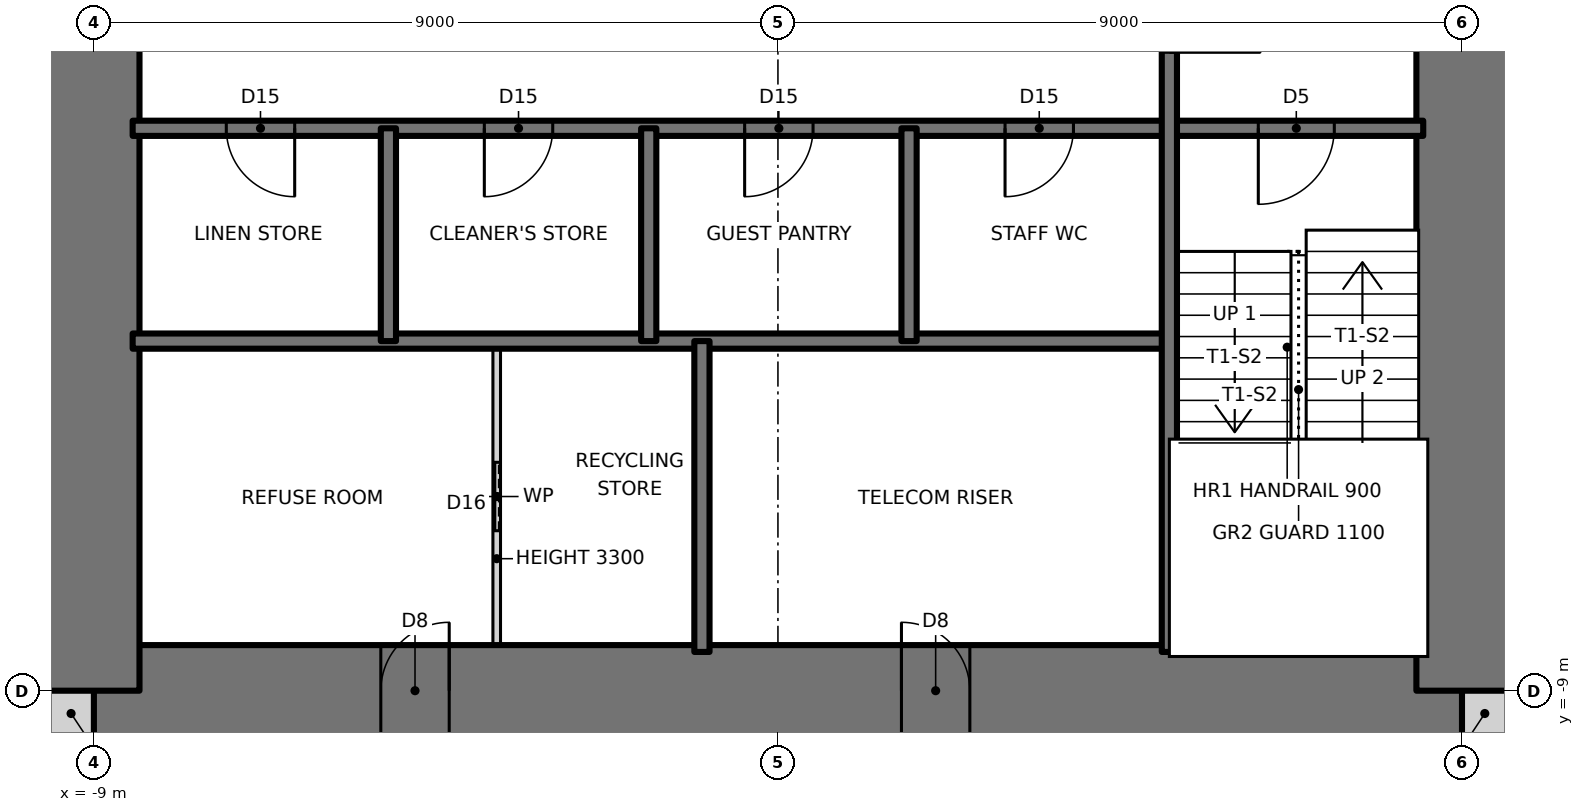
"""IFC4 building model, lengths in metres.
Left out: names, types, materials, properties, quantities, classifications, styles, units other than length and angle.
Written with IfcOpenShell. Run it as: python <this file> out.ifc"""

import sys

from ifc_helpers import new_model, si_unit, direction, frame, frame_2d, origin, place, context, subcontext, project, spatial, rectangle, extrude, element, fill, save


model = new_model("IFC4")
c1 = context("Model", 3, precision=1e-05, world=origin(), true_north=direction((0.0, 1.0)))
c2 = subcontext(c1, "Body", "Model", "MODEL_VIEW")
j1 = project(units=[si_unit("LENGTHUNIT", "METRE"), si_unit("PLANEANGLEUNIT", "RADIAN")], contexts=[c1])
p1 = place(None, origin())
s1 = spatial("IfcSite", under=j1, at=p1, CompositionType="ELEMENT")
p2 = place(p1, origin())
s2 = spatial("IfcBuilding", under=s1, at=p2, CompositionType="ELEMENT")
p3 = place(p2, frame((0.0, 0.0, 257.0)))
s3 = spatial("IfcBuildingStorey", under=s2, at=p3, CompositionType="ELEMENT", Elevation=257.0)
for number, where, z_axis, x_axis in (
    (1, (-9.6, -9.3, 0.0), (0.0, 0.0, 1.0), (1.0, 0.0, 0.0)),
    (2, (9.0, -9.3, 0.0), (0.0, 0.0, 1.0), (1.0, 0.0, 0.0)),
):
    element("IfcWall", number, at=place(p3, frame(where, z_axis=z_axis, x_axis=x_axis)), inside=s3, PredefinedType="SOLIDWALL", context=c2, shape_type="SweptSolid", body=[
        extrude(rectangle(XDim=0.6, YDim=0.6, at=frame_2d((0.3, 0.0))), origin(), (0.0, 0.0, 1.0), 3.5),
    ])
p4 = place(p3, frame((-9.0, -9.0, 0.0), z_axis=(0.0, 0.0, 1.0), x_axis=(1.0, 0.0, 0.0)))
e3 = element("IfcWall", 3, at=p4, inside=s3, PredefinedType="SHEAR", context=c2, shape_type="SweptSolid", body=[
    extrude(rectangle(XDim=18.0, YDim=1.2, at=frame_2d((9.0, 0.0))), origin(), (0.0, 0.0, 1.0), 3.5),
])
p5 = place(p4, frame((3.775, 0.0, 0.0)))
e4 = element("IfcOpeningElement", 4, at=p5, cuts=e3, PredefinedType="OPENING", context=c2, shape_type="SweptSolid", body=[
    extrude(rectangle(XDim=0.9, YDim=2.1, at=frame_2d((0.45, 1.05))), frame((0.0, 0.61, 0.0), z_axis=(0.0, -1.0, 0.0), x_axis=(1.0, 0.0, 0.0)), (0.0, 0.0, 1.0), 1.22),
])
p6 = place(p4, frame((10.625, 0.0, 0.0)))
e5 = element("IfcOpeningElement", 5, at=p6, cuts=e3, PredefinedType="OPENING", context=c2, shape_type="SweptSolid", body=[
    extrude(rectangle(XDim=0.9, YDim=2.1, at=frame_2d((0.45, 1.05))), frame((0.0, 0.61, 0.0), z_axis=(0.0, -1.0, 0.0), x_axis=(1.0, 0.0, 0.0)), (0.0, 0.0, 1.0), 1.22),
])
p7 = place(p3, frame((9.0, -9.0, 0.0), z_axis=(0.0, 0.0, 1.0), x_axis=(0.0, 1.0, 0.0)))
e6 = element("IfcWall", 6, at=p7, inside=s3, PredefinedType="SHEAR", context=c2, shape_type="SweptSolid", body=[
    extrude(rectangle(XDim=18.0, YDim=1.2, at=frame_2d((9.0, 0.0))), origin(), (0.0, 0.0, 1.0), 3.5),
])
p8 = place(p7, frame((8.5, 0.0, 0.0)))
e7 = element("IfcOpeningElement", 7, at=p8, cuts=e6, PredefinedType="OPENING", context=c2, shape_type="SweptSolid", body=[
    extrude(rectangle(XDim=1.0, YDim=2.1, at=frame_2d((0.5, 1.05))), frame((0.0, 0.61, 0.0), z_axis=(0.0, -1.0, 0.0), x_axis=(1.0, 0.0, 0.0)), (0.0, 0.0, 1.0), 1.22),
])
p9 = place(p3, frame((-9.0, 9.0, 0.0), z_axis=(0.0, 0.0, 1.0), x_axis=(0.0, -1.0, 0.0)))
e8 = element("IfcWall", 8, at=p9, inside=s3, PredefinedType="SHEAR", context=c2, shape_type="SweptSolid", body=[
    extrude(rectangle(XDim=18.0, YDim=1.2, at=frame_2d((9.0, 0.0))), origin(), (0.0, 0.0, 1.0), 3.5),
])
p10 = place(p9, frame((8.5, 0.0, 0.0)))
e9 = element("IfcOpeningElement", 9, at=p10, cuts=e8, PredefinedType="OPENING", context=c2, shape_type="SweptSolid", body=[
    extrude(rectangle(XDim=1.0, YDim=2.1, at=frame_2d((0.5, 1.05))), frame((0.0, 0.61, 0.0), z_axis=(0.0, -1.0, 0.0), x_axis=(1.0, 0.0, 0.0)), (0.0, 0.0, 1.0), 1.22),
])
p11 = place(p3, frame((-8.49, -4.4, 0.0), z_axis=(0.0, 0.0, 1.0), x_axis=(1.0, 0.0, 0.0)))
e10 = element("IfcWall", 10, at=p11, inside=s3, PredefinedType="SOLIDWALL", context=c2, shape_type="SweptSolid", body=[
    extrude(rectangle(XDim=13.64, YDim=0.2, at=frame_2d((6.82, 0.0))), origin(), (0.0, 0.0, 1.0), 3.5),
])
p12 = place(p3, frame((-8.49, -1.6, 0.0), z_axis=(0.0, 0.0, 1.0), x_axis=(1.0, 0.0, 0.0)))
e11 = element("IfcWall", 11, at=p12, inside=s3, PredefinedType="SOLIDWALL", context=c2, shape_type="SweptSolid", body=[
    extrude(rectangle(XDim=16.98, YDim=0.2, at=frame_2d((8.49, 0.0))), origin(), (0.0, 0.0, 1.0), 3.5),
])
p13 = place(p12, frame((14.81, 0.0, 0.0)))
e12 = element("IfcOpeningElement", 12, at=p13, cuts=e11, PredefinedType="OPENING", context=c2, shape_type="SweptSolid", body=[
    extrude(rectangle(XDim=1.0, YDim=2.1, at=frame_2d((0.5, 1.05))), frame((0.0, 0.11, 0.0), z_axis=(0.0, -1.0, 0.0), x_axis=(1.0, 0.0, 0.0)), (0.0, 0.0, 1.0), 0.22),
])
p14 = place(p12, frame((1.232, 0.0, 0.0)))
e13 = element("IfcOpeningElement", 13, at=p14, cuts=e11, PredefinedType="OPENING", context=c2, shape_type="SweptSolid", body=[
    extrude(rectangle(XDim=0.9, YDim=2.1, at=frame_2d((0.45, 1.05))), frame((0.0, 0.11, 0.0), z_axis=(0.0, -1.0, 0.0), x_axis=(1.0, 0.0, 0.0)), (0.0, 0.0, 1.0), 0.22),
])
p15 = place(p12, frame((4.627, 0.0, 0.0)))
e14 = element("IfcOpeningElement", 14, at=p15, cuts=e11, PredefinedType="OPENING", context=c2, shape_type="SweptSolid", body=[
    extrude(rectangle(XDim=0.9, YDim=2.1, at=frame_2d((0.45, 1.05))), frame((0.0, 0.11, 0.0), z_axis=(0.0, -1.0, 0.0), x_axis=(1.0, 0.0, 0.0)), (0.0, 0.0, 1.0), 0.22),
])
p16 = place(p12, frame((8.052, 0.0, 0.0)))
e15 = element("IfcOpeningElement", 15, at=p16, cuts=e11, PredefinedType="OPENING", context=c2, shape_type="SweptSolid", body=[
    extrude(rectangle(XDim=0.9, YDim=2.1, at=frame_2d((0.45, 1.05))), frame((0.0, 0.11, 0.0), z_axis=(0.0, -1.0, 0.0), x_axis=(1.0, 0.0, 0.0)), (0.0, 0.0, 1.0), 0.22),
])
p17 = place(p12, frame((11.478, 0.0, 0.0)))
e16 = element("IfcOpeningElement", 16, at=p17, cuts=e11, PredefinedType="OPENING", context=c2, shape_type="SweptSolid", body=[
    extrude(rectangle(XDim=0.9, YDim=2.1, at=frame_2d((0.45, 1.05))), frame((0.0, 0.11, 0.0), z_axis=(0.0, -1.0, 0.0), x_axis=(1.0, 0.0, 0.0)), (0.0, 0.0, 1.0), 0.22),
])
p18 = place(p3, frame((5.15, -8.49, 0.0), z_axis=(0.0, 0.0, 1.0), x_axis=(0.0, 1.0, 0.0)))
e17 = element("IfcWall", 17, at=p18, inside=s3, PredefinedType="SOLIDWALL", context=c2, shape_type="SweptSolid", body=[
    extrude(rectangle(XDim=13.09, YDim=0.2, at=frame_2d((6.545, 0.0))), origin(), (0.0, 0.0, 1.0), 3.5),
])
p19 = place(p18, frame((7.89, 0.0, 0.0)))
e18 = element("IfcOpeningElement", 18, at=p19, cuts=e17, PredefinedType="OPENING", context=c2, shape_type="SweptSolid", body=[
    extrude(rectangle(XDim=1.2, YDim=2.1, at=frame_2d((0.6, 1.05))), frame((0.0, 0.11, 0.0), z_axis=(0.0, -1.0, 0.0), x_axis=(1.0, 0.0, 0.0)), (0.0, 0.0, 1.0), 0.22),
])
p20 = place(p3, frame((1.725, -4.4, 0.0), z_axis=(0.0, 0.0, 1.0), x_axis=(0.0, 1.0, 0.0)))
e19 = element("IfcWall", 19, at=p20, inside=s3, PredefinedType="SOLIDWALL", context=c2, shape_type="SweptSolid", body=[
    extrude(rectangle(XDim=2.8, YDim=0.2, at=frame_2d((1.4, 0.0))), origin(), (0.0, 0.0, 1.0), 3.5),
])
p21 = place(p3, frame((-1.0, -8.49, 0.0), z_axis=(0.0, 0.0, 1.0), x_axis=(0.0, 1.0, 0.0)))
e20 = element("IfcWall", 20, at=p21, inside=s3, PredefinedType="SOLIDWALL", context=c2, shape_type="SweptSolid", body=[
    extrude(rectangle(XDim=4.09, YDim=0.2, at=frame_2d((2.045, 0.0))), origin(), (0.0, 0.0, 1.0), 3.5),
])
p22 = place(p3, frame((-1.7, -4.4, 0.0), z_axis=(0.0, 0.0, 1.0), x_axis=(0.0, 1.0, 0.0)))
e21 = element("IfcWall", 21, at=p22, inside=s3, PredefinedType="SOLIDWALL", context=c2, shape_type="SweptSolid", body=[
    extrude(rectangle(XDim=2.8, YDim=0.2, at=frame_2d((1.4, 0.0))), origin(), (0.0, 0.0, 1.0), 3.5),
])
p23 = place(p3, frame((-3.7, -8.49, 0.0), z_axis=(0.0, 0.0, 1.0), x_axis=(0.0, 1.0, 0.0)))
e22 = element("IfcWall", 22, at=p23, inside=s3, PredefinedType="PARTITIONING", context=c2, shape_type="SweptSolid", body=[
    extrude(rectangle(XDim=4.09, YDim=0.1, at=frame_2d((2.045, 0.0))), origin(), (0.0, 0.0, 1.0), 3.3),
])
p24 = place(p23, frame((1.595, 0.0, 0.0)))
e23 = element("IfcOpeningElement", 23, at=p24, cuts=e22, PredefinedType="OPENING", context=c2, shape_type="SweptSolid", body=[
    extrude(rectangle(XDim=0.9, YDim=2.1, at=frame_2d((0.45, 1.05))), frame((0.0, 0.06, 0.0), z_axis=(0.0, -1.0, 0.0), x_axis=(1.0, 0.0, 0.0)), (0.0, 0.0, 1.0), 0.12),
])
p25 = place(p3, frame((-5.125, -4.4, 0.0), z_axis=(0.0, 0.0, 1.0), x_axis=(0.0, 1.0, 0.0)))
e24 = element("IfcWall", 24, at=p25, inside=s3, PredefinedType="SOLIDWALL", context=c2, shape_type="SweptSolid", body=[
    extrude(rectangle(XDim=2.8, YDim=0.2, at=frame_2d((1.4, 0.0))), origin(), (0.0, 0.0, 1.0), 3.5),
])
p26 = place(p13, frame((1.0, 0.0, 0.0), z_axis=(0.0, 0.0, 1.0), x_axis=(-1.0, 0.0, 0.0)))
e25 = element("IfcDoor", 25, at=p26, inside=s3, OperationType="SINGLE_SWING_RIGHT", PredefinedType="DOOR", context=c2, shape_type="SweptSolid", body=[
    extrude(rectangle(XDim=1.0, YDim=2.1, at=frame_2d((0.5, 1.05))), frame((0.0, 0.025, 0.0), z_axis=(0.0, -1.0, 0.0), x_axis=(1.0, 0.0, 0.0)), (0.0, 0.0, 1.0), 0.05),
])
fill(e12, e25)
p27 = place(p19, frame((1.2, 0.0, 0.0), z_axis=(0.0, 0.0, 1.0), x_axis=(-1.0, 0.0, 0.0)))
e26 = element("IfcDoor", 26, at=p27, inside=s3, OperationType="SINGLE_SWING_RIGHT", PredefinedType="DOOR", context=c2, shape_type="SweptSolid", body=[
    extrude(rectangle(XDim=1.2, YDim=2.1, at=frame_2d((0.6, 1.05))), frame((0.0, 0.025, 0.0), z_axis=(0.0, -1.0, 0.0), x_axis=(1.0, 0.0, 0.0)), (0.0, 0.0, 1.0), 0.05),
])
fill(e18, e26)
p28 = place(p14, frame((0.9, 0.0, 0.0), z_axis=(0.0, 0.0, 1.0), x_axis=(-1.0, 0.0, 0.0)))
e27 = element("IfcDoor", 27, at=p28, inside=s3, OperationType="SINGLE_SWING_LEFT", PredefinedType="DOOR", context=c2, shape_type="SweptSolid", body=[
    extrude(rectangle(XDim=0.9, YDim=2.1, at=frame_2d((0.45, 1.05))), frame((0.0, 0.025, 0.0), z_axis=(0.0, -1.0, 0.0), x_axis=(1.0, 0.0, 0.0)), (0.0, 0.0, 1.0), 0.05),
])
fill(e13, e27)
p29 = place(p15, frame((0.9, 0.0, 0.0), z_axis=(0.0, 0.0, 1.0), x_axis=(-1.0, 0.0, 0.0)))
e28 = element("IfcDoor", 28, at=p29, inside=s3, OperationType="SINGLE_SWING_RIGHT", PredefinedType="DOOR", context=c2, shape_type="SweptSolid", body=[
    extrude(rectangle(XDim=0.9, YDim=2.1, at=frame_2d((0.45, 1.05))), frame((0.0, 0.025, 0.0), z_axis=(0.0, -1.0, 0.0), x_axis=(1.0, 0.0, 0.0)), (0.0, 0.0, 1.0), 0.05),
])
fill(e14, e28)
p30 = place(p16, frame((0.9, 0.0, 0.0), z_axis=(0.0, 0.0, 1.0), x_axis=(-1.0, 0.0, 0.0)))
e29 = element("IfcDoor", 29, at=p30, inside=s3, OperationType="SINGLE_SWING_RIGHT", PredefinedType="DOOR", context=c2, shape_type="SweptSolid", body=[
    extrude(rectangle(XDim=0.9, YDim=2.1, at=frame_2d((0.45, 1.05))), frame((0.0, 0.025, 0.0), z_axis=(0.0, -1.0, 0.0), x_axis=(1.0, 0.0, 0.0)), (0.0, 0.0, 1.0), 0.05),
])
fill(e15, e29)
p31 = place(p17, frame((0.9, 0.0, 0.0), z_axis=(0.0, 0.0, 1.0), x_axis=(-1.0, 0.0, 0.0)))
e30 = element("IfcDoor", 30, at=p31, inside=s3, OperationType="SINGLE_SWING_RIGHT", PredefinedType="DOOR", context=c2, shape_type="SweptSolid", body=[
    extrude(rectangle(XDim=0.9, YDim=2.1, at=frame_2d((0.45, 1.05))), frame((0.0, 0.025, 0.0), z_axis=(0.0, -1.0, 0.0), x_axis=(1.0, 0.0, 0.0)), (0.0, 0.0, 1.0), 0.05),
])
fill(e16, e30)
p32 = place(p24, origin())
e31 = element("IfcDoor", 31, at=p32, inside=s3, OperationType="SLIDING_TO_LEFT", PredefinedType="DOOR", context=c2, shape_type="SweptSolid", body=[
    extrude(rectangle(XDim=0.9, YDim=2.1, at=frame_2d((0.45, 1.05))), frame((0.0, 0.025, 0.0), z_axis=(0.0, -1.0, 0.0), x_axis=(1.0, 0.0, 0.0)), (0.0, 0.0, 1.0), 0.05),
])
fill(e23, e31)
p33 = place(p5, origin())
e32 = element("IfcDoor", 32, at=p33, inside=s3, OperationType="SINGLE_SWING_RIGHT", PredefinedType="DOOR", context=c2, shape_type="SweptSolid", body=[
    extrude(rectangle(XDim=0.9, YDim=2.1, at=frame_2d((0.45, 1.05))), frame((0.0, 0.025, 0.0), z_axis=(0.0, -1.0, 0.0), x_axis=(1.0, 0.0, 0.0)), (0.0, 0.0, 1.0), 0.05),
])
fill(e4, e32)
p34 = place(p6, origin())
e33 = element("IfcDoor", 33, at=p34, inside=s3, OperationType="SINGLE_SWING_LEFT", PredefinedType="DOOR", context=c2, shape_type="SweptSolid", body=[
    extrude(rectangle(XDim=0.9, YDim=2.1, at=frame_2d((0.45, 1.05))), frame((0.0, 0.025, 0.0), z_axis=(0.0, -1.0, 0.0), x_axis=(1.0, 0.0, 0.0)), (0.0, 0.0, 1.0), 0.05),
])
fill(e5, e33)
save(model, sys.argv[1])
